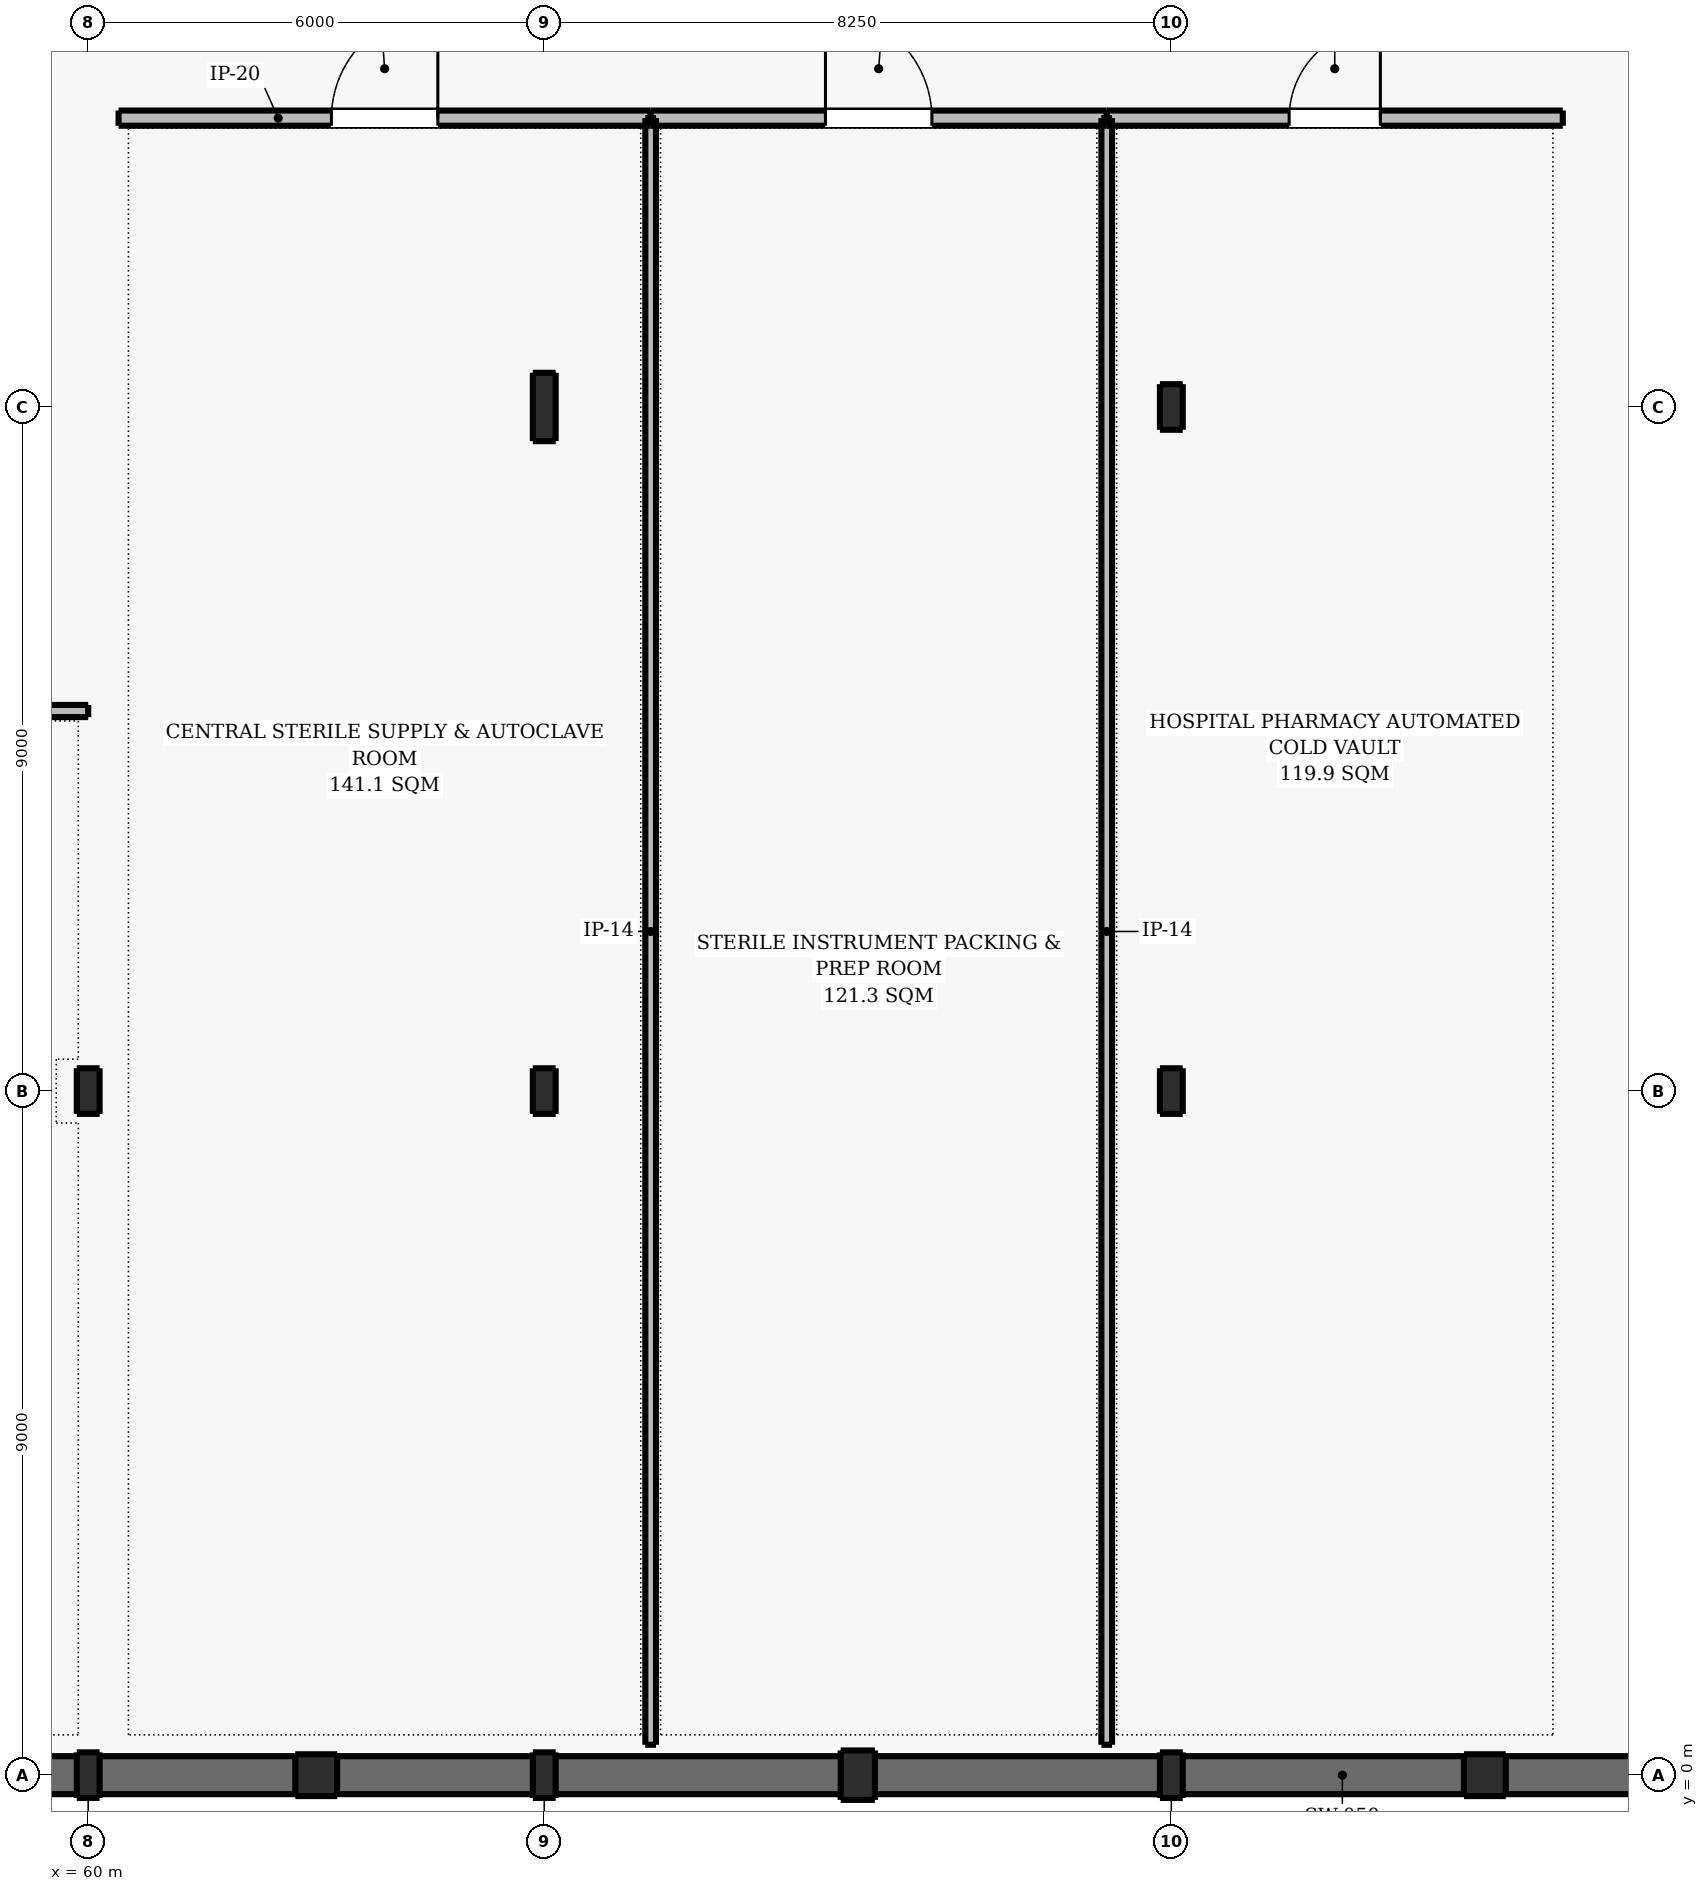
"""IFC4 building model, lengths in metres.
Left out: names, types, materials, properties, quantities, classifications, styles, units other than length and angle.
Written with IfcOpenShell. Run it as: python <this file> out.ifc"""

import sys

from ifc_helpers import new_model, si_unit, direction, frame, frame_2d, origin, origin_2d, place, context, subcontext, project, spatial, rectangle, i_section, extrude, element, fill, save


model = new_model("IFC4")
c1 = context("Model", 3, precision=1e-05, world=origin(), true_north=direction((0.0, 1.0)))
c2 = subcontext(c1, "Body", "Model", "MODEL_VIEW")
j1 = project(units=[si_unit("LENGTHUNIT", "METRE"), si_unit("PLANEANGLEUNIT", "RADIAN")], contexts=[c1])
p1 = place(None, origin())
s1 = spatial("IfcSite", under=j1, at=p1, CompositionType="ELEMENT")
p2 = place(p1, origin())
s2 = spatial("IfcBuilding", under=s1, at=p2, CompositionType="ELEMENT")
p3 = place(p2, frame((0.0, 0.0, -4.8)))
s3 = spatial("IfcBuildingStorey", under=s2, at=p3, CompositionType="ELEMENT", Elevation=-4.8)
for number, where, z_axis, x_axis in (
    (1, (60.0, 0.0, 0.0), (0.0, 0.0, 1.0), (1.0, 0.0, 0.0)),
    (2, (60.0, 9.0, 0.0), (0.0, 0.0, 1.0), (1.0, 0.0, 0.0)),
):
    element("IfcColumn", number, at=place(p3, frame(where, z_axis=z_axis, x_axis=x_axis)), inside=s3, PredefinedType="COLUMN", context=c2, shape_type="SweptSolid", body=[
        extrude(i_section(OverallWidth=0.3, OverallDepth=0.6, WebThickness=0.015, FlangeThickness=0.03, FilletRadius=0.027, at=origin_2d()), origin(), (0.0, 0.0, 1.0), 4.8),
    ])
p4 = place(p3, frame((63.0, 0.0, 0.0), z_axis=(0.0, 0.0, 1.0), x_axis=(1.0, 0.0, 0.0)))
e3 = element("IfcColumn", 3, at=p4, inside=s3, PredefinedType="PILASTER", context=c2, shape_type="SweptSolid", body=[
    extrude(rectangle(XDim=0.55, YDim=0.55, at=origin_2d()), origin(), (0.0, 0.0, 1.0), 4.8),
])
for number, where, z_axis, x_axis in (
    (4, (66.0, 0.0, 0.0), (0.0, 0.0, 1.0), (1.0, 0.0, 0.0)),
    (5, (66.0, 9.0, 0.0), (0.0, 0.0, 1.0), (1.0, 0.0, 0.0)),
):
    element("IfcColumn", number, at=place(p3, frame(where, z_axis=z_axis, x_axis=x_axis)), inside=s3, PredefinedType="COLUMN", context=c2, shape_type="SweptSolid", body=[
        extrude(i_section(OverallWidth=0.3, OverallDepth=0.6, WebThickness=0.015, FlangeThickness=0.03, FilletRadius=0.027, at=origin_2d()), origin(), (0.0, 0.0, 1.0), 4.8),
    ])
p5 = place(p3, frame((66.0, 18.0, 0.0), z_axis=(0.0, 0.0, 1.0), x_axis=(1.0, 0.0, 0.0)))
e6 = element("IfcColumn", 6, at=p5, inside=s3, PredefinedType="COLUMN", context=c2, shape_type="SweptSolid", body=[
    extrude(i_section(OverallWidth=0.3, OverallDepth=0.9, WebThickness=0.019, FlangeThickness=0.035, FilletRadius=0.03, at=origin_2d()), origin(), (0.0, 0.0, 1.0), 4.8),
])
p6 = place(p3, frame((70.125, 0.0, 0.0), z_axis=(0.0, 0.0, 1.0), x_axis=(1.0, 0.0, 0.0)))
e7 = element("IfcColumn", 7, at=p6, inside=s3, PredefinedType="PILASTER", context=c2, shape_type="SweptSolid", body=[
    extrude(rectangle(XDim=0.45, YDim=0.65, at=origin_2d()), origin(), (0.0, 0.0, 1.0), 4.8),
])
for number, where, z_axis, x_axis in (
    (8, (74.25, 0.0, 0.0), (0.0, 0.0, 1.0), (1.0, 0.0, 0.0)),
    (9, (74.25, 9.0, 0.0), (0.0, 0.0, 1.0), (1.0, 0.0, 0.0)),
    (10, (74.25, 18.0, 0.0), (0.0, 0.0, 1.0), (1.0, 0.0, 0.0)),
):
    element("IfcColumn", number, at=place(p3, frame(where, z_axis=z_axis, x_axis=x_axis)), inside=s3, PredefinedType="COLUMN", context=c2, shape_type="SweptSolid", body=[
        extrude(i_section(OverallWidth=0.3, OverallDepth=0.6, WebThickness=0.015, FlangeThickness=0.03, FilletRadius=0.027, at=origin_2d()), origin(), (0.0, 0.0, 1.0), 4.8),
    ])
p7 = place(p3, frame((78.375, 0.0, 0.0), z_axis=(0.0, 0.0, 1.0), x_axis=(1.0, 0.0, 0.0)))
e11 = element("IfcColumn", 11, at=p7, inside=s3, PredefinedType="PILASTER", context=c2, shape_type="SweptSolid", body=[
    extrude(rectangle(XDim=0.55, YDim=0.55, at=origin_2d()), origin(), (0.0, 0.0, 1.0), 4.8),
])
p8 = place(p3, frame((99.0, 0.0, 0.0), z_axis=(0.0, 0.0, 1.0), x_axis=(-1.0, 0.0, 0.0)))
e12 = element("IfcWall", 12, at=p8, inside=s3, PredefinedType="SOLIDWALL", context=c2, shape_type="SweptSolid", body=[
    extrude(rectangle(XDim=45.0, YDim=0.5, at=frame_2d((22.5, 0.0))), origin(), (0.0, 0.0, 1.0), 4.5),
])
p9 = place(p3, frame((54.4, 14.0, 0.0), z_axis=(0.0, 0.0, 1.0), x_axis=(1.0, 0.0, 0.0)))
e13 = element("IfcWall", 13, at=p9, inside=s3, PredefinedType="PARTITIONING", context=c2, shape_type="SweptSolid", body=[
    extrude(rectangle(XDim=5.6, YDim=0.16, at=frame_2d((2.8, 0.0))), origin(), (0.0, 0.0, 1.0), 4.5),
])
p10 = place(p9, frame((2.2, 0.0, 0.0)))
e14 = element("IfcOpeningElement", 14, at=p10, cuts=e13, PredefinedType="OPENING", context=c2, shape_type="SweptSolid", body=[
    extrude(rectangle(XDim=1.2, YDim=2.2, at=frame_2d((0.6, 1.1))), frame((0.0, 0.09, 0.0), z_axis=(0.0, -1.0, 0.0), x_axis=(1.0, 0.0, 0.0)), (0.0, 0.0, 1.0), 0.18),
])
p11 = place(p3, frame((60.4, 21.8, 0.0), z_axis=(0.0, 0.0, 1.0), x_axis=(1.0, 0.0, 0.0)))
e15 = element("IfcWall", 15, at=p11, inside=s3, PredefinedType="PARTITIONING", context=c2, shape_type="SweptSolid", body=[
    extrude(rectangle(XDim=7.0, YDim=0.2, at=frame_2d((3.5, 0.0))), origin(), (0.0, 0.0, 1.0), 4.5),
])
p12 = place(p11, frame((2.8, 0.0, 0.0)))
e16 = element("IfcOpeningElement", 16, at=p12, cuts=e15, PredefinedType="OPENING", context=c2, shape_type="SweptSolid", body=[
    extrude(rectangle(XDim=1.4, YDim=2.2, at=frame_2d((0.7, 1.1))), frame((0.0, 0.11, 0.0), z_axis=(0.0, -1.0, 0.0), x_axis=(1.0, 0.0, 0.0)), (0.0, 0.0, 1.0), 0.22),
])
p13 = place(p3, frame((67.4, 0.4, 0.0), z_axis=(0.0, 0.0, 1.0), x_axis=(0.0, 1.0, 0.0)))
e17 = element("IfcWall", 17, at=p13, inside=s3, PredefinedType="PARTITIONING", context=c2, shape_type="SweptSolid", body=[
    extrude(rectangle(XDim=21.4, YDim=0.14, at=frame_2d((10.7, 0.0))), origin(), (0.0, 0.0, 1.0), 4.5),
])
p14 = place(p3, frame((67.4, 21.8, 0.0), z_axis=(0.0, 0.0, 1.0), x_axis=(1.0, 0.0, 0.0)))
e18 = element("IfcWall", 18, at=p14, inside=s3, PredefinedType="PARTITIONING", context=c2, shape_type="SweptSolid", body=[
    extrude(rectangle(XDim=6.0, YDim=0.2, at=frame_2d((3.0, 0.0))), origin(), (0.0, 0.0, 1.0), 4.5),
])
p15 = place(p14, frame((2.3, 0.0, 0.0)))
e19 = element("IfcOpeningElement", 19, at=p15, cuts=e18, PredefinedType="OPENING", context=c2, shape_type="SweptSolid", body=[
    extrude(rectangle(XDim=1.4, YDim=2.2, at=frame_2d((0.7, 1.1))), frame((0.0, 0.11, 0.0), z_axis=(0.0, -1.0, 0.0), x_axis=(1.0, 0.0, 0.0)), (0.0, 0.0, 1.0), 0.22),
])
p16 = place(p3, frame((73.4, 0.4, 0.0), z_axis=(0.0, 0.0, 1.0), x_axis=(0.0, 1.0, 0.0)))
e20 = element("IfcWall", 20, at=p16, inside=s3, PredefinedType="PARTITIONING", context=c2, shape_type="SweptSolid", body=[
    extrude(rectangle(XDim=21.4, YDim=0.14, at=frame_2d((10.7, 0.0))), origin(), (0.0, 0.0, 1.0), 4.5),
])
p17 = place(p3, frame((73.4, 21.8, 0.0), z_axis=(0.0, 0.0, 1.0), x_axis=(1.0, 0.0, 0.0)))
e21 = element("IfcWall", 21, at=p17, inside=s3, PredefinedType="PARTITIONING", context=c2, shape_type="SweptSolid", body=[
    extrude(rectangle(XDim=6.0, YDim=0.2, at=frame_2d((3.0, 0.0))), origin(), (0.0, 0.0, 1.0), 4.5),
])
p18 = place(p17, frame((2.4, 0.0, 0.0)))
e22 = element("IfcOpeningElement", 22, at=p18, cuts=e21, PredefinedType="OPENING", context=c2, shape_type="SweptSolid", body=[
    extrude(rectangle(XDim=1.2, YDim=2.2, at=frame_2d((0.6, 1.1))), frame((0.0, 0.11, 0.0), z_axis=(0.0, -1.0, 0.0), x_axis=(1.0, 0.0, 0.0)), (0.0, 0.0, 1.0), 0.22),
])
p19 = place(p12, origin())
e23 = element("IfcDoor", 23, at=p19, inside=s3, OperationType="SINGLE_SWING_RIGHT", PredefinedType="DOOR", context=c2, shape_type="SweptSolid", body=[
    extrude(rectangle(XDim=1.4, YDim=2.2, at=frame_2d((0.7, 1.1))), frame((0.0, 0.025, 0.0), z_axis=(0.0, -1.0, 0.0), x_axis=(1.0, 0.0, 0.0)), (0.0, 0.0, 1.0), 0.05),
])
fill(e16, e23)
p20 = place(p15, origin())
e24 = element("IfcDoor", 24, at=p20, inside=s3, OperationType="SINGLE_SWING_LEFT", PredefinedType="DOOR", context=c2, shape_type="SweptSolid", body=[
    extrude(rectangle(XDim=1.4, YDim=2.2, at=frame_2d((0.7, 1.1))), frame((0.0, 0.025, 0.0), z_axis=(0.0, -1.0, 0.0), x_axis=(1.0, 0.0, 0.0)), (0.0, 0.0, 1.0), 0.05),
])
fill(e19, e24)
p21 = place(p18, origin())
e25 = element("IfcDoor", 25, at=p21, inside=s3, OperationType="SINGLE_SWING_RIGHT", PredefinedType="DOOR", context=c2, shape_type="SweptSolid", body=[
    extrude(rectangle(XDim=1.2, YDim=2.2, at=frame_2d((0.6, 1.1))), frame((0.0, 0.025, 0.0), z_axis=(0.0, -1.0, 0.0), x_axis=(1.0, 0.0, 0.0)), (0.0, 0.0, 1.0), 0.05),
])
fill(e22, e25)
save(model, sys.argv[1])
